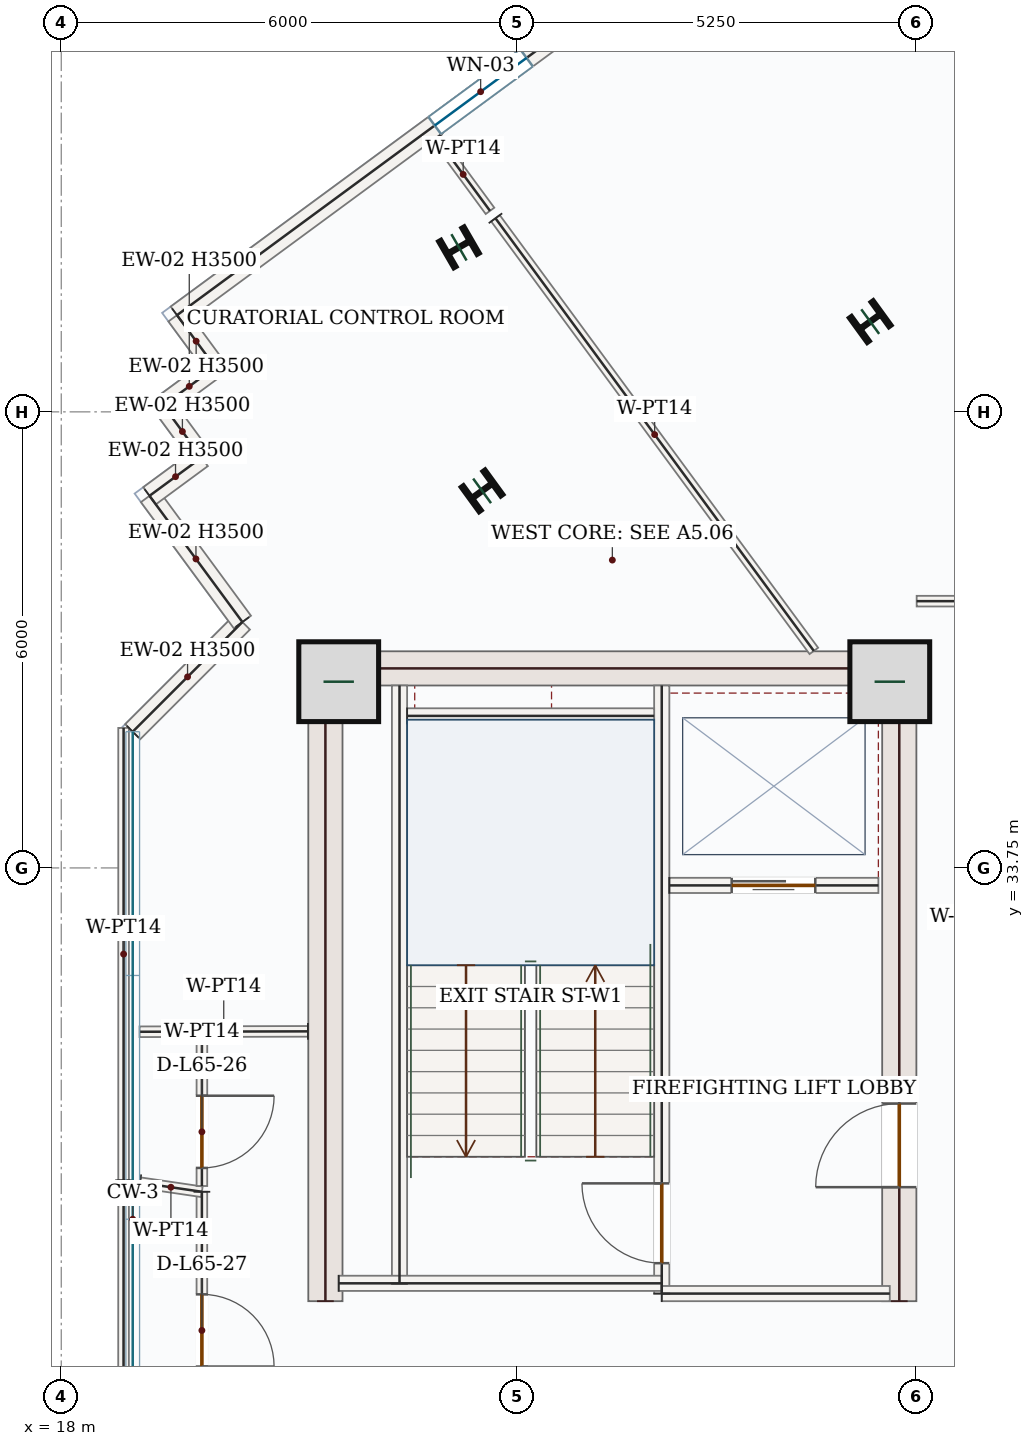
"""IFC4 building model, lengths in metres.
Left out: names, types, materials, properties, quantities, classifications, styles, units other than length and angle.
Written with IfcOpenShell. Run it as: python <this file> out.ifc"""

import sys

from ifc_helpers import new_model, si_unit, direction, frame, frame_2d, origin, origin_2d, place, context, subcontext, project, spatial, rectangle, i_section, extrude, source, transform, mapped, element, fill, save


model = new_model("IFC4")
c1 = context("Model", 3, precision=1e-05, world=origin(), true_north=direction((0.0, 1.0)))
c2 = subcontext(c1, "Body", "Model", "MODEL_VIEW")
j1 = project(units=[si_unit("LENGTHUNIT", "METRE"), si_unit("PLANEANGLEUNIT", "RADIAN")], contexts=[c1])
p1 = place(None, origin())
s1 = spatial("IfcSite", under=j1, at=p1, CompositionType="ELEMENT")
p2 = place(p1, origin())
s2 = spatial("IfcBuilding", under=s1, at=p2, CompositionType="ELEMENT")
p3 = place(p2, frame((0.0, 0.0, 272.85)))
s3 = spatial("IfcBuildingStorey", under=s2, at=p3, CompositionType="ELEMENT", Elevation=272.85)
m1 = source(origin(), c2, "Body", "SweptSolid", [
    extrude(rectangle(XDim=8.55, YDim=0.45, at=frame_2d((4.275, 0.0))), origin(), (0.0, 0.0, 1.0), 3.5),
])
p4 = place(p3, frame((21.475, 28.05, 0.0), z_axis=(0.0, 0.0, 1.0), x_axis=(0.0, 1.0, 0.0)))
e1 = element("IfcWall", 1, at=p4, inside=s3, PredefinedType="SHEAR", context=c2, shape_type="MappedRepresentation", body=[
    mapped(m1, transform((0.0, 0.0, 0.0), x_axis=(1.0, 0.0, 0.0), y_axis=(0.0, 1.0, 0.0), z_axis=(0.0, 0.0, 1.0), scale=1.0)),
])
p5 = place(p3, frame((29.025, 28.05, 0.0), z_axis=(0.0, 0.0, 1.0), x_axis=(0.0, 1.0, 0.0)))
e2 = element("IfcWall", 2, at=p5, inside=s3, PredefinedType="SHEAR", context=c2, shape_type="SweptSolid", body=[
    extrude(rectangle(XDim=8.55, YDim=0.45, at=frame_2d((4.275, 0.0))), origin(), (0.0, 0.0, 1.0), 3.5),
])
p6 = place(p5, frame((1.5, 0.0, 0.0)))
e3 = element("IfcOpeningElement", 3, at=p6, cuts=e2, PredefinedType="OPENING", context=c2, shape_type="SweptSolid", body=[
    extrude(rectangle(XDim=1.1, YDim=2.2, at=frame_2d((0.55, 1.1))), frame((0.0, 0.235, 0.0), z_axis=(0.0, -1.0, 0.0), x_axis=(1.0, 0.0, 0.0)), (0.0, 0.0, 1.0), 0.47),
])
m2 = source(origin(), c2, "Body", "SweptSolid", [
    extrude(rectangle(XDim=7.1, YDim=0.45, at=frame_2d((3.55, 0.0))), origin(), (0.0, 0.0, 1.0), 3.5),
])
p7 = place(p3, frame((21.7, 36.375, 0.0), z_axis=(0.0, 0.0, 1.0), x_axis=(1.0, 0.0, 0.0)))
e4 = element("IfcWall", 4, at=p7, inside=s3, PredefinedType="SHEAR", context=c2, shape_type="MappedRepresentation", body=[
    mapped(m2, transform((0.0, 0.0, 0.0), x_axis=(1.0, 0.0, 0.0), y_axis=(0.0, 1.0, 0.0), z_axis=(0.0, 0.0, 1.0), scale=1.0)),
])
m3 = source(origin(), c2, "Body", "SweptSolid", [
    extrude(rectangle(XDim=1.05, YDim=1.05, at=origin_2d()), origin(), (0.0, 0.0, 1.0), 3.75),
])
for number, where, z_axis, x_axis in (
    (5, (21.65, 36.2, 0.0), (0.0, 0.0, 1.0), (1.0, 0.0, 0.0)),
    (6, (28.9, 36.2, 0.0), (0.0, 0.0, 1.0), (1.0, 0.0, 0.0)),
):
    element("IfcColumn", number, at=place(p3, frame(where, z_axis=z_axis, x_axis=x_axis)), inside=s3, PredefinedType="COLUMN", context=c2, shape_type="MappedRepresentation", body=[
        mapped(m3, transform((0.0, 0.0, 0.0), x_axis=(1.0, 0.0, 0.0), y_axis=(0.0, 1.0, 0.0), z_axis=(0.0, 0.0, 1.0), scale=1.0)),
    ])
m4 = source(origin(), c2, "Body", "SweptSolid", [
    extrude(i_section(OverallWidth=0.399, OverallDepth=0.386, WebThickness=0.021, FlangeThickness=0.033, FilletRadius=0.018, at=origin_2d()), origin(), (0.0, 0.0, 1.0), 3.75),
])
for number, where, z_axis, x_axis in (
    (7, (28.643, 40.937, 0.0), (0.0, 0.0, 1.0), (-0.588, 0.809, 0.0)),
    (8, (23.536, 38.711, 0.0), (0.0, 0.0, 1.0), (-0.588, 0.809, 0.0)),
    (9, (23.232, 41.914, 0.0), (0.0, 0.0, 1.0), (-0.5, 0.866, 0.0)),
):
    element("IfcColumn", number, at=place(p3, frame(where, z_axis=z_axis, x_axis=x_axis)), inside=s3, PredefinedType="COLUMN", context=c2, shape_type="MappedRepresentation", body=[
        mapped(m4, transform((0.0, 0.0, 0.0), x_axis=(1.0, 0.0, 0.0), y_axis=(0.0, 1.0, 0.0), z_axis=(0.0, 0.0, 1.0), scale=1.0)),
    ])
m5 = source(origin(), c2, "Body", "SweptSolid", [
    extrude(rectangle(XDim=2.041, YDim=0.28, at=frame_2d((1.02, 0.0))), origin(), (0.0, 0.0, 1.0), 3.5),
])
p8 = place(p3, frame((18.94, 35.542, 0.0), z_axis=(0.0, 0.0, 1.0), x_axis=(0.707106781187, 0.707106781187, 0.0)))
e10 = element("IfcWall", 10, at=p8, inside=s3, PredefinedType="SOLIDWALL", context=c2, shape_type="MappedRepresentation", body=[
    mapped(m5, transform((0.0, 0.0, 0.0), x_axis=(1.0, 0.0, 0.0), y_axis=(0.0, 1.0, 0.0), z_axis=(0.0, 0.0, 1.0), scale=1.0)),
])
m6 = source(origin(), c2, "Body", "SweptSolid", [
    extrude(rectangle(XDim=2.062, YDim=0.28, at=frame_2d((1.031, 0.0))), origin(), (0.0, 0.0, 1.0), 3.5),
])
p9 = place(p3, frame((20.383, 36.985, 0.0), z_axis=(0.0, 0.0, 1.0), x_axis=(-0.592718215209, 0.80540990642, 0.0)))
e11 = element("IfcWall", 11, at=p9, inside=s3, PredefinedType="SOLIDWALL", context=c2, shape_type="MappedRepresentation", body=[
    mapped(m6, transform((0.0, 0.0, 0.0), x_axis=(1.0, 0.0, 0.0), y_axis=(0.0, 1.0, 0.0), z_axis=(0.0, 0.0, 1.0), scale=1.0)),
])
m7 = source(origin(), c2, "Body", "SweptSolid", [
    extrude(rectangle(XDim=0.85, YDim=0.28, at=frame_2d((0.425, 0.0))), origin(), (0.0, 0.0, 1.0), 3.5),
])
p10 = place(p3, frame((19.161, 38.645, 0.0), z_axis=(0.0, 0.0, 1.0), x_axis=(0.80534450163, 0.592807079659, 0.0)))
e12 = element("IfcWall", 12, at=p10, inside=s3, PredefinedType="SOLIDWALL", context=c2, shape_type="MappedRepresentation", body=[
    mapped(m7, transform((0.0, 0.0, 0.0), x_axis=(1.0, 0.0, 0.0), y_axis=(0.0, 1.0, 0.0), z_axis=(0.0, 0.0, 1.0), scale=1.0)),
])
m8 = source(origin(), c2, "Body", "SweptSolid", [
    extrude(rectangle(XDim=0.85, YDim=0.28, at=frame_2d((0.425, 0.0))), origin(), (0.0, 0.0, 1.0), 3.5),
])
for number, where, z_axis, x_axis in (
    (13, (19.845, 39.149, 0.0), (0.0, 0.0, 1.0), (-0.593, 0.805, 0.0)),
    (14, (19.342, 39.834, 0.0), (0.0, 0.0, 1.0), (0.805, 0.593, 0.0)),
):
    element("IfcWall", number, at=place(p3, frame(where, z_axis=z_axis, x_axis=x_axis)), inside=s3, PredefinedType="SOLIDWALL", context=c2, shape_type="MappedRepresentation", body=[
        mapped(m8, transform((0.0, 0.0, 0.0), x_axis=(1.0, 0.0, 0.0), y_axis=(0.0, 1.0, 0.0), z_axis=(0.0, 0.0, 1.0), scale=1.0)),
    ])
m9 = source(origin(), c2, "Body", "SweptSolid", [
    extrude(rectangle(XDim=0.85, YDim=0.28, at=frame_2d((0.425, 0.0))), origin(), (0.0, 0.0, 1.0), 3.5),
])
p11 = place(p3, frame((20.026, 40.337, 0.0), z_axis=(0.0, 0.0, 1.0), x_axis=(-0.592669983425, 0.805445398986, 0.0)))
e15 = element("IfcWall", 15, at=p11, inside=s3, PredefinedType="SOLIDWALL", context=c2, shape_type="MappedRepresentation", body=[
    mapped(m9, transform((0.0, 0.0, 0.0), x_axis=(1.0, 0.0, 0.0), y_axis=(0.0, 1.0, 0.0), z_axis=(0.0, 0.0, 1.0), scale=1.0)),
])
p12 = place(p3, frame((19.522, 41.022, 0.0), z_axis=(0.0, 0.0, 1.0), x_axis=(0.805418797839, 0.592706132994, 0.0)))
e16 = element("IfcWall", 16, at=p12, inside=s3, PredefinedType="SOLIDWALL", context=c2, shape_type="SweptSolid", body=[
    extrude(rectangle(XDim=9.92, YDim=0.28, at=frame_2d((4.96, 0.0))), origin(), (0.0, 0.0, 1.0), 3.5),
])
p13 = place(p12, frame((4.21, 0.0, 0.85)))
e17 = element("IfcOpeningElement", 17, at=p13, cuts=e16, PredefinedType="OPENING", context=c2, shape_type="SweptSolid", body=[
    extrude(rectangle(XDim=1.5, YDim=1.5, at=frame_2d((0.75, 0.75))), frame((0.0, 0.15, 0.0), z_axis=(0.0, -1.0, 0.0), x_axis=(1.0, 0.0, 0.0)), (0.0, 0.0, 1.0), 0.3),
])
m10 = source(origin(), c2, "Body", "SweptSolid", [
    extrude(rectangle(XDim=7.87, YDim=0.2, at=frame_2d((3.935, 0.0))), origin(), (0.0, 0.0, 1.0), 3.5),
])
p14 = place(p3, frame((22.45, 28.28, 0.0), z_axis=(0.0, 0.0, 1.0), x_axis=(0.0, 1.0, 0.0)))
e18 = element("IfcWall", 18, at=p14, inside=s3, PredefinedType="SOLIDWALL", context=c2, shape_type="MappedRepresentation", body=[
    mapped(m10, transform((0.0, 0.0, 0.0), x_axis=(1.0, 0.0, 0.0), y_axis=(0.0, 1.0, 0.0), z_axis=(0.0, 0.0, 1.0), scale=1.0)),
])
p15 = place(p3, frame((25.9, 28.15, 0.0), z_axis=(0.0, 0.0, 1.0), x_axis=(0.0, 1.0, 0.0)))
e19 = element("IfcWall", 19, at=p15, inside=s3, PredefinedType="SOLIDWALL", context=c2, shape_type="SweptSolid", body=[
    extrude(rectangle(XDim=8.0, YDim=0.2, at=frame_2d((4.0, 0.0))), origin(), (0.0, 0.0, 1.0), 3.5),
])
p16 = place(p15, frame((0.4, 0.0, 0.0)))
e20 = element("IfcOpeningElement", 20, at=p16, cuts=e19, PredefinedType="OPENING", context=c2, shape_type="SweptSolid", body=[
    extrude(rectangle(XDim=1.05, YDim=2.15, at=frame_2d((0.525, 1.075))), frame((0.0, 0.11, 0.0), z_axis=(0.0, -1.0, 0.0), x_axis=(1.0, 0.0, 0.0)), (0.0, 0.0, 1.0), 0.22),
])
m11 = source(origin(), c2, "Body", "SweptSolid", [
    extrude(rectangle(XDim=4.25, YDim=0.2, at=frame_2d((2.125, 0.0))), origin(), (0.0, 0.0, 1.0), 3.5),
])
p17 = place(p3, frame((21.65, 28.285, 0.0), z_axis=(0.0, 0.0, 1.0), x_axis=(1.0, 0.0, 0.0)))
e21 = element("IfcWall", 21, at=p17, inside=s3, PredefinedType="SOLIDWALL", context=c2, shape_type="MappedRepresentation", body=[
    mapped(m11, transform((0.0, 0.0, 0.0), x_axis=(1.0, 0.0, 0.0), y_axis=(0.0, 1.0, 0.0), z_axis=(0.0, 0.0, 1.0), scale=1.0)),
])
m12 = source(origin(), c2, "Body", "SweptSolid", [
    extrude(rectangle(XDim=3.0, YDim=0.2, at=frame_2d((1.5, 0.0))), origin(), (0.0, 0.0, 1.0), 3.5),
])
p18 = place(p3, frame((25.9, 28.15, 0.0), z_axis=(0.0, 0.0, 1.0), x_axis=(1.0, 0.0, 0.0)))
e22 = element("IfcWall", 22, at=p18, inside=s3, PredefinedType="SOLIDWALL", context=c2, shape_type="MappedRepresentation", body=[
    mapped(m12, transform((0.0, 0.0, 0.0), x_axis=(1.0, 0.0, 0.0), y_axis=(0.0, 1.0, 0.0), z_axis=(0.0, 0.0, 1.0), scale=1.0)),
])
m13 = source(origin(), c2, "Body", "SweptSolid", [
    extrude(rectangle(XDim=3.25, YDim=0.2, at=frame_2d((1.625, 0.0))), origin(), (0.0, 0.0, 1.0), 3.5),
])
p19 = place(p3, frame((22.55, 35.75, 0.0), z_axis=(0.0, 0.0, 1.0), x_axis=(1.0, 0.0, 0.0)))
e23 = element("IfcWall", 23, at=p19, inside=s3, PredefinedType="SOLIDWALL", context=c2, shape_type="MappedRepresentation", body=[
    mapped(m13, transform((0.0, 0.0, 0.0), x_axis=(1.0, 0.0, 0.0), y_axis=(0.0, 1.0, 0.0), z_axis=(0.0, 0.0, 1.0), scale=1.0)),
])
p20 = place(p3, frame((26.0, 33.52, 0.0), z_axis=(0.0, 0.0, 1.0), x_axis=(1.0, 0.0, 0.0)))
e24 = element("IfcWall", 24, at=p20, inside=s3, PredefinedType="SOLIDWALL", context=c2, shape_type="SweptSolid", body=[
    extrude(rectangle(XDim=2.75, YDim=0.2, at=frame_2d((1.375, 0.0))), origin(), (0.0, 0.0, 1.0), 3.5),
])
p21 = place(p20, frame((0.82, 0.0, 0.0)))
e25 = element("IfcOpeningElement", 25, at=p21, cuts=e24, PredefinedType="OPENING", context=c2, shape_type="SweptSolid", body=[
    extrude(rectangle(XDim=1.1, YDim=2.15, at=frame_2d((0.55, 1.075))), frame((0.0, 0.11, 0.0), z_axis=(0.0, -1.0, 0.0), x_axis=(1.0, 0.0, 0.0)), (0.0, 0.0, 1.0), 0.22),
])
p22 = place(p3, frame((19.85, 29.49, 0.0), z_axis=(0.0, 0.0, 1.0), x_axis=(0.0, -1.0, 0.0)))
e26 = element("IfcWall", 26, at=p22, inside=s3, PredefinedType="PARTITIONING", context=c2, shape_type="SweptSolid", body=[
    extrude(rectangle(XDim=7.083, YDim=0.14, at=frame_2d((3.542, 0.0))), origin(), (0.0, 0.0, 1.0), 3.5),
])
p23 = place(p22, frame((1.349, 0.0, 0.0)))
e27 = element("IfcOpeningElement", 27, at=p23, cuts=e26, PredefinedType="OPENING", context=c2, shape_type="SweptSolid", body=[
    extrude(rectangle(XDim=0.95, YDim=2.15, at=frame_2d((0.475, 1.075))), frame((0.0, 0.08, 0.0), z_axis=(0.0, -1.0, 0.0), x_axis=(1.0, 0.0, 0.0)), (0.0, 0.0, 1.0), 0.16),
])
m14 = source(origin(), c2, "Body", "SweptSolid", [
    extrude(rectangle(XDim=6.836, YDim=0.14, at=frame_2d((3.418, 0.0))), origin(), (0.0, 0.0, 1.0), 3.5),
])
p24 = place(p3, frame((18.818, 22.805, 0.0), z_axis=(0.0, 0.0, 1.0), x_axis=(0.000285724478, 0.999999959181, 0.0)))
e28 = element("IfcWall", 28, at=p24, inside=s3, PredefinedType="PARTITIONING", context=c2, shape_type="MappedRepresentation", body=[
    mapped(m14, transform((0.0, 0.0, 0.0), x_axis=(1.0, 0.0, 0.0), y_axis=(0.0, 1.0, 0.0), z_axis=(0.0, 0.0, 1.0), scale=1.0)),
])
m15 = source(origin(), c2, "Body", "SweptSolid", [
    extrude(rectangle(XDim=0.824, YDim=0.14, at=frame_2d((0.412, 0.0))), origin(), (0.0, 0.0, 1.0), 3.5),
])
p25 = place(p3, frame((19.035, 29.609, 0.0), z_axis=(0.0, 0.0, 1.0), x_axis=(0.989445525715, -0.144905319579, 0.0)))
e29 = element("IfcWall", 29, at=p25, inside=s3, PredefinedType="PARTITIONING", context=c2, shape_type="MappedRepresentation", body=[
    mapped(m15, transform((0.0, 0.0, 0.0), x_axis=(1.0, 0.0, 0.0), y_axis=(0.0, 1.0, 0.0), z_axis=(0.0, 0.0, 1.0), scale=1.0)),
])
p26 = place(p3, frame((19.851, 31.596, 0.0), z_axis=(0.0, 0.0, 1.0), x_axis=(-0.000240384608, -0.999999971108, 0.0)))
e30 = element("IfcWall", 30, at=p26, inside=s3, PredefinedType="PARTITIONING", context=c2, shape_type="SweptSolid", body=[
    extrude(rectangle(XDim=2.031, YDim=0.14, at=frame_2d((1.016, 0.0))), origin(), (0.0, 0.0, 1.0), 3.5),
])
p27 = place(p26, frame((0.844, 0.0, 0.0)))
e31 = element("IfcOpeningElement", 31, at=p27, cuts=e30, PredefinedType="OPENING", context=c2, shape_type="SweptSolid", body=[
    extrude(rectangle(XDim=0.95, YDim=2.15, at=frame_2d((0.475, 1.075))), frame((0.0, 0.08, 0.0), z_axis=(0.0, -1.0, 0.0), x_axis=(1.0, 0.0, 0.0)), (0.0, 0.0, 1.0), 0.16),
])
m16 = source(origin(), c2, "Body", "SweptSolid", [
    extrude(rectangle(XDim=5.951, YDim=0.14, at=frame_2d((2.976, 0.0))), origin(), (0.0, 0.0, 1.0), 3.5),
])
p28 = place(p3, frame((18.82, 29.64, 0.0), z_axis=(0.0, 0.0, 1.0), x_axis=(0.0, 1.0, 0.0)))
e32 = element("IfcWall", 32, at=p28, inside=s3, PredefinedType="PARTITIONING", context=c2, shape_type="MappedRepresentation", body=[
    mapped(m16, transform((0.0, 0.0, 0.0), x_axis=(1.0, 0.0, 0.0), y_axis=(0.0, 1.0, 0.0), z_axis=(0.0, 0.0, 1.0), scale=1.0)),
])
m17 = source(origin(), c2, "Body", "SweptSolid", [
    extrude(rectangle(XDim=1.191, YDim=0.14, at=frame_2d((0.595, 0.0))), origin(), (0.0, 0.0, 1.0), 3.5),
])
p29 = place(p3, frame((22.935, 43.353, 0.0), z_axis=(0.0, 0.0, 1.0), x_axis=(0.592625306686, -0.80547827151, 0.0)))
e33 = element("IfcWall", 33, at=p29, inside=s3, PredefinedType="PARTITIONING", context=c2, shape_type="MappedRepresentation", body=[
    mapped(m17, transform((0.0, 0.0, 0.0), x_axis=(1.0, 0.0, 0.0), y_axis=(0.0, 1.0, 0.0), z_axis=(0.0, 0.0, 1.0), scale=1.0)),
])
m18 = source(origin(), c2, "Body", "SweptSolid", [
    extrude(rectangle(XDim=7.067, YDim=0.14, at=frame_2d((3.533, 0.0))), origin(), (0.0, 0.0, 1.0), 3.5),
])
p30 = place(p3, frame((23.712, 42.297, 0.0), z_axis=(0.0, 0.0, 1.0), x_axis=(0.592689830588, -0.805430794493, 0.0)))
e34 = element("IfcWall", 34, at=p30, inside=s3, PredefinedType="PARTITIONING", context=c2, shape_type="MappedRepresentation", body=[
    mapped(m18, transform((0.0, 0.0, 0.0), x_axis=(1.0, 0.0, 0.0), y_axis=(0.0, 1.0, 0.0), z_axis=(0.0, 0.0, 1.0), scale=1.0)),
])
m19 = source(origin(), c2, "Body", "SweptSolid", [
    extrude(rectangle(XDim=2.215, YDim=0.14, at=frame_2d((1.107, 0.0))), origin(), (0.0, 0.0, 1.0), 3.5),
])
p31 = place(p3, frame((21.245, 31.6, 0.0), z_axis=(0.0, 0.0, 1.0), x_axis=(-0.999997060242, -0.002424769682, 0.0)))
e35 = element("IfcWall", 35, at=p31, inside=s3, PredefinedType="PARTITIONING", context=c2, shape_type="MappedRepresentation", body=[
    mapped(m19, transform((0.0, 0.0, 0.0), x_axis=(1.0, 0.0, 0.0), y_axis=(0.0, 1.0, 0.0), z_axis=(0.0, 0.0, 1.0), scale=1.0)),
])
p32 = place(p3, frame((37.55, 37.26, 0.0), z_axis=(0.0, 0.0, 1.0), x_axis=(-0.999999998268, -5.8852956e-05, 0.0)))
e36 = element("IfcWall", 36, at=p32, inside=s3, PredefinedType="PARTITIONING", context=c2, shape_type="SweptSolid", body=[
    extrude(rectangle(XDim=8.297, YDim=0.14, at=frame_2d((4.148, 0.0))), origin(), (0.0, 0.0, 1.0), 3.5),
])
p33 = place(p32, frame((1.616, 0.0, 0.0)))
e37 = element("IfcOpeningElement", 37, at=p33, cuts=e36, PredefinedType="OPENING", context=c2, shape_type="SweptSolid", body=[
    extrude(rectangle(XDim=0.95, YDim=2.15, at=frame_2d((0.475, 1.075))), frame((0.0, 0.08, 0.0), z_axis=(0.0, -1.0, 0.0), x_axis=(1.0, 0.0, 0.0)), (0.0, 0.0, 1.0), 0.16),
])
m20 = source(origin(), c2, "Body", "SweptSolid", [
    extrude(rectangle(XDim=1.5, YDim=1.5, at=frame_2d((0.75, 0.75))), frame((0.0, 0.03, 0.0), z_axis=(0.0, -1.0, 0.0), x_axis=(1.0, 0.0, 0.0)), (0.0, 0.0, 1.0), 0.06),
])
p34 = place(p13, origin())
e38 = element("IfcWindow", 38, at=p34, inside=s3, PartitioningType="SINGLE_PANEL", PredefinedType="WINDOW", context=c2, shape_type="MappedRepresentation", body=[
    mapped(m20, transform((0.0, 0.0, 0.0), x_axis=(1.0, 0.0, 0.0), y_axis=(0.0, 1.0, 0.0), z_axis=(0.0, 0.0, 1.0), scale=1.0)),
])
fill(e17, e38)
m21 = source(origin(), c2, "Body", "SweptSolid", [
    extrude(rectangle(XDim=1.05, YDim=2.15, at=frame_2d((0.525, 1.075))), frame((0.0, 0.025, 0.0), z_axis=(0.0, -1.0, 0.0), x_axis=(1.0, 0.0, 0.0)), (0.0, 0.0, 1.0), 0.05),
])
p35 = place(p16, origin())
e39 = element("IfcDoor", 39, at=p35, inside=s3, OperationType="SINGLE_SWING_RIGHT", PredefinedType="DOOR", context=c2, shape_type="MappedRepresentation", body=[
    mapped(m21, transform((0.0, 0.0, 0.0), x_axis=(1.0, 0.0, 0.0), y_axis=(0.0, 1.0, 0.0), z_axis=(0.0, 0.0, 1.0), scale=1.0)),
])
fill(e20, e39)
m22 = source(origin(), c2, "Body", "SweptSolid", [
    extrude(rectangle(XDim=1.1, YDim=2.15, at=frame_2d((0.55, 1.075))), frame((0.0, 0.025, 0.0), z_axis=(0.0, -1.0, 0.0), x_axis=(1.0, 0.0, 0.0)), (0.0, 0.0, 1.0), 0.05),
])
p36 = place(p21, origin())
e40 = element("IfcDoor", 40, at=p36, inside=s3, OperationType="DOUBLE_DOOR_SLIDING", PredefinedType="DOOR", context=c2, shape_type="MappedRepresentation", body=[
    mapped(m22, transform((0.0, 0.0, 0.0), x_axis=(1.0, 0.0, 0.0), y_axis=(0.0, 1.0, 0.0), z_axis=(0.0, 0.0, 1.0), scale=1.0)),
])
fill(e25, e40)
m23 = source(origin(), c2, "Body", "SweptSolid", [
    extrude(rectangle(XDim=1.1, YDim=2.2, at=frame_2d((0.55, 1.1))), frame((0.0, 0.025, 0.0), z_axis=(0.0, -1.0, 0.0), x_axis=(1.0, 0.0, 0.0)), (0.0, 0.0, 1.0), 0.05),
])
p37 = place(p6, origin())
e41 = element("IfcDoor", 41, at=p37, inside=s3, OperationType="SINGLE_SWING_LEFT", PredefinedType="DOOR", context=c2, shape_type="MappedRepresentation", body=[
    mapped(m23, transform((0.0, 0.0, 0.0), x_axis=(1.0, 0.0, 0.0), y_axis=(0.0, 1.0, 0.0), z_axis=(0.0, 0.0, 1.0), scale=1.0)),
])
fill(e3, e41)
m24 = source(origin(), c2, "Body", "SweptSolid", [
    extrude(rectangle(XDim=0.95, YDim=2.15, at=frame_2d((0.475, 1.075))), frame((0.0, 0.025, 0.0), z_axis=(0.0, -1.0, 0.0), x_axis=(1.0, 0.0, 0.0)), (0.0, 0.0, 1.0), 0.05),
])
p38 = place(p27, origin())
e42 = element("IfcDoor", 42, at=p38, inside=s3, OperationType="SINGLE_SWING_LEFT", PredefinedType="DOOR", context=c2, shape_type="MappedRepresentation", body=[
    mapped(m24, transform((0.0, 0.0, 0.0), x_axis=(1.0, 0.0, 0.0), y_axis=(0.0, 1.0, 0.0), z_axis=(0.0, 0.0, 1.0), scale=1.0)),
])
fill(e31, e42)
p39 = place(p23, origin())
e43 = element("IfcDoor", 43, at=p39, inside=s3, OperationType="SINGLE_SWING_RIGHT", PredefinedType="DOOR", context=c2, shape_type="MappedRepresentation", body=[
    mapped(m24, transform((0.0, 0.0, 0.0), x_axis=(1.0, 0.0, 0.0), y_axis=(0.0, 1.0, 0.0), z_axis=(0.0, 0.0, 1.0), scale=1.0)),
])
fill(e27, e43)
save(model, sys.argv[1])
